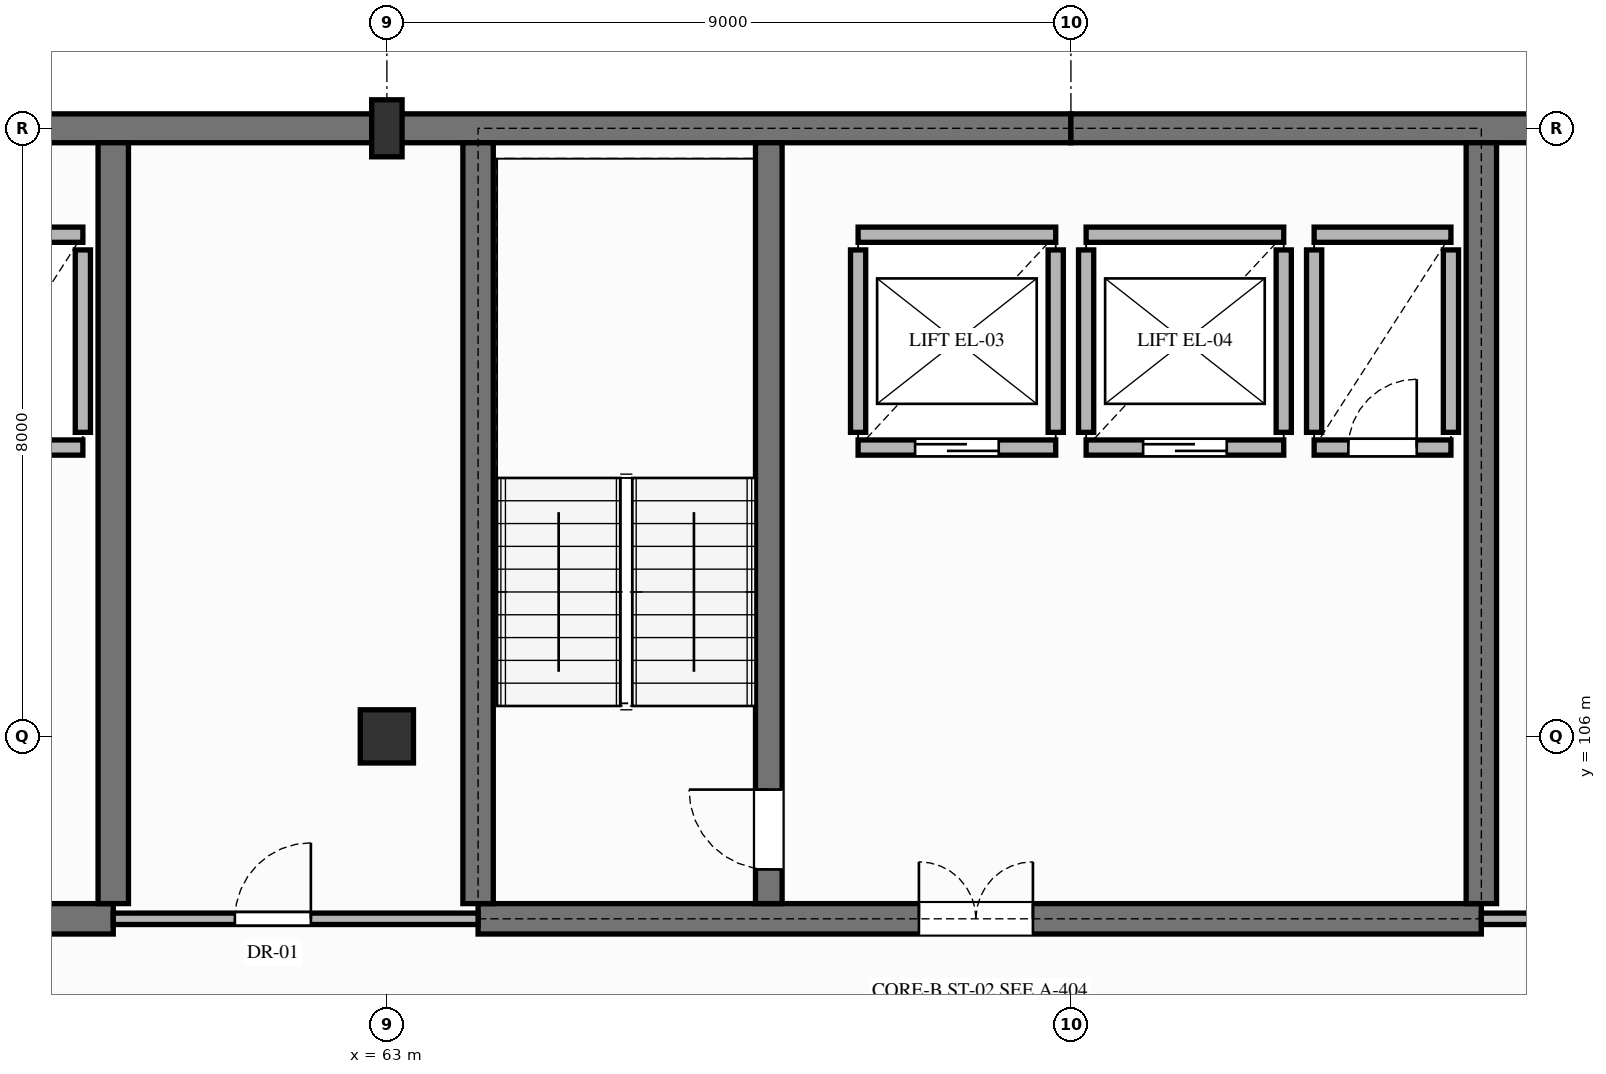
"""IFC4 building model, lengths in metres.
Left out: names, types, materials, properties, quantities, classifications, styles, units other than length and angle.
Written with IfcOpenShell. Run it as: python <this file> out.ifc"""

import sys

from ifc_helpers import new_model, si_unit, direction, frame, frame_2d, origin, origin_2d, place, context, subcontext, project, spatial, rectangle, extrude, element, fill, save


model = new_model("IFC4")
c1 = context("Model", 3, precision=1e-05, world=origin(), true_north=direction((0.0, 1.0)))
c2 = subcontext(c1, "Body", "Model", "MODEL_VIEW")
j1 = project(units=[si_unit("LENGTHUNIT", "METRE"), si_unit("PLANEANGLEUNIT", "RADIAN")], contexts=[c1])
p1 = place(None, origin())
s1 = spatial("IfcSite", under=j1, at=p1, CompositionType="ELEMENT")
p2 = place(p1, origin())
s2 = spatial("IfcBuilding", under=s1, at=p2, CompositionType="ELEMENT")
p3 = place(p2, frame((0.0, 0.0, 12.78)))
s3 = spatial("IfcBuildingStorey", under=s2, at=p3, CompositionType="ELEMENT", Elevation=12.78)
p4 = place(p3, frame((63.0, 106.0, 0.0), z_axis=(0.0, 0.0, 1.0), x_axis=(1.0, 0.0, 0.0)))
e1 = element("IfcColumn", 1, at=p4, inside=s3, PredefinedType="COLUMN", context=c2, shape_type="SweptSolid", body=[
    extrude(rectangle(XDim=0.7, YDim=0.7, at=origin_2d()), origin(), (0.0, 0.0, 1.0), 3.74),
])
p5 = place(p3, frame((63.0, 114.0, 0.0), z_axis=(0.0, 0.0, 1.0), x_axis=(0.0, 1.0, 0.0)))
e2 = element("IfcColumn", 2, at=p5, inside=s3, PredefinedType="COLUMN", context=c2, shape_type="SweptSolid", body=[
    extrude(rectangle(XDim=0.4, YDim=0.75, at=origin_2d()), origin(), (0.0, 0.0, 1.0), 3.74),
])
for number, where, z_axis, x_axis in (
    (3, (54.0, 114.0, 0.0), (0.0, 0.0, 1.0), (1.0, 0.0, 0.0)),
    (4, (63.0, 114.0, 0.0), (0.0, 0.0, 1.0), (1.0, 0.0, 0.0)),
    (5, (72.0, 114.0, 0.0), (0.0, 0.0, 1.0), (1.0, 0.0, 0.0)),
):
    element("IfcWall", number, at=place(p3, frame(where, z_axis=z_axis, x_axis=x_axis)), inside=s3, PredefinedType="SOLIDWALL", context=c2, shape_type="SweptSolid", body=[
        extrude(rectangle(XDim=9.0, YDim=0.38, at=frame_2d((4.5, 0.0))), origin(), (0.0, 0.0, 1.0), 3.42),
    ])
p6 = place(p3, frame((46.2, 103.6, 0.0), z_axis=(0.0, 0.0, 1.0), x_axis=(1.0, 0.0, 0.0)))
e6 = element("IfcWall", 6, at=p6, inside=s3, PredefinedType="SHEAR", context=c2, shape_type="SweptSolid", body=[
    extrude(rectangle(XDim=13.2, YDim=0.4, at=frame_2d((6.6, 0.0))), origin(), (0.0, 0.0, 1.0), 3.42),
])
p7 = place(p6, frame((5.8, 0.0, 0.0)))
e7 = element("IfcOpeningElement", 7, at=p7, cuts=e6, PredefinedType="OPENING", context=c2, shape_type="SweptSolid", body=[
    extrude(rectangle(XDim=1.5, YDim=2.2, at=frame_2d((0.75, 1.1))), frame((0.0, 0.21, 0.0), z_axis=(0.0, -1.0, 0.0), x_axis=(1.0, 0.0, 0.0)), (0.0, 0.0, 1.0), 0.42),
])
p8 = place(p3, frame((59.4, 103.8, 0.0), z_axis=(0.0, 0.0, 1.0), x_axis=(0.0, 1.0, 0.0)))
e8 = element("IfcWall", 8, at=p8, inside=s3, PredefinedType="SHEAR", context=c2, shape_type="SweptSolid", body=[
    extrude(rectangle(XDim=10.01, YDim=0.4, at=frame_2d((5.005, 0.0))), origin(), (0.0, 0.0, 1.0), 3.42),
])
p9 = place(p3, frame((57.2, 109.8, 0.0), z_axis=(0.0, 0.0, 1.0), x_axis=(1.0, 0.0, 0.0)))
e9 = element("IfcWall", 9, at=p9, inside=s3, PredefinedType="PARTITIONING", context=c2, shape_type="SweptSolid", body=[
    extrude(rectangle(XDim=1.8, YDim=0.2, at=frame_2d((0.9, 0.0))), origin(), (0.0, 0.0, 1.0), 3.42),
])
p10 = place(p9, frame((0.45, 0.0, 0.0)))
e10 = element("IfcOpeningElement", 10, at=p10, cuts=e9, PredefinedType="OPENING", context=c2, shape_type="SweptSolid", body=[
    extrude(rectangle(XDim=0.9, YDim=2.1, at=frame_2d((0.45, 1.05))), frame((0.0, 0.11, 0.0), z_axis=(0.0, -1.0, 0.0), x_axis=(1.0, 0.0, 0.0)), (0.0, 0.0, 1.0), 0.22),
])
p11 = place(p3, frame((57.2, 112.6, 0.0), z_axis=(0.0, 0.0, 1.0), x_axis=(1.0, 0.0, 0.0)))
e11 = element("IfcWall", 11, at=p11, inside=s3, PredefinedType="PARTITIONING", context=c2, shape_type="SweptSolid", body=[
    extrude(rectangle(XDim=1.8, YDim=0.2, at=frame_2d((0.9, 0.0))), origin(), (0.0, 0.0, 1.0), 3.42),
])
p12 = place(p3, frame((59.0, 110.0, 0.0), z_axis=(0.0, 0.0, 1.0), x_axis=(0.0, 1.0, 0.0)))
e12 = element("IfcWall", 12, at=p12, inside=s3, PredefinedType="PARTITIONING", context=c2, shape_type="SweptSolid", body=[
    extrude(rectangle(XDim=2.4, YDim=0.2, at=frame_2d((1.2, 0.0))), origin(), (0.0, 0.0, 1.0), 3.42),
])
p13 = place(p3, frame((64.2, 103.6, 0.0), z_axis=(0.0, 0.0, 1.0), x_axis=(1.0, 0.0, 0.0)))
e13 = element("IfcWall", 13, at=p13, inside=s3, PredefinedType="SHEAR", context=c2, shape_type="SweptSolid", body=[
    extrude(rectangle(XDim=13.2, YDim=0.4, at=frame_2d((6.6, 0.0))), origin(), (0.0, 0.0, 1.0), 3.42),
])
p14 = place(p13, frame((5.8, 0.0, 0.0)))
e14 = element("IfcOpeningElement", 14, at=p14, cuts=e13, PredefinedType="OPENING", context=c2, shape_type="SweptSolid", body=[
    extrude(rectangle(XDim=1.5, YDim=2.2, at=frame_2d((0.75, 1.1))), frame((0.0, 0.21, 0.0), z_axis=(0.0, -1.0, 0.0), x_axis=(1.0, 0.0, 0.0)), (0.0, 0.0, 1.0), 0.42),
])
for number, where, z_axis, x_axis in (
    (15, (64.2, 103.8, 0.0), (0.0, 0.0, 1.0), (0.0, 1.0, 0.0)),
    (16, (77.4, 103.8, 0.0), (0.0, 0.0, 1.0), (0.0, 1.0, 0.0)),
):
    element("IfcWall", number, at=place(p3, frame(where, z_axis=z_axis, x_axis=x_axis)), inside=s3, PredefinedType="SHEAR", context=c2, shape_type="SweptSolid", body=[
        extrude(rectangle(XDim=10.01, YDim=0.4, at=frame_2d((5.005, 0.0))), origin(), (0.0, 0.0, 1.0), 3.42),
    ])
p15 = place(p3, frame((68.025, 103.8, 0.0), z_axis=(0.0, 0.0, 1.0), x_axis=(0.0, 1.0, 0.0)))
e17 = element("IfcWall", 17, at=p15, inside=s3, PredefinedType="SHEAR", context=c2, shape_type="SweptSolid", body=[
    extrude(rectangle(XDim=10.01, YDim=0.35, at=frame_2d((5.005, 0.0))), origin(), (0.0, 0.0, 1.0), 3.42),
])
p16 = place(p15, frame((0.45, 0.0, 0.0)))
e18 = element("IfcOpeningElement", 18, at=p16, cuts=e17, PredefinedType="OPENING", context=c2, shape_type="SweptSolid", body=[
    extrude(rectangle(XDim=1.05, YDim=2.2, at=frame_2d((0.525, 1.1))), frame((0.0, 0.185, 0.0), z_axis=(0.0, -1.0, 0.0), x_axis=(1.0, 0.0, 0.0)), (0.0, 0.0, 1.0), 0.37),
])
p17 = place(p3, frame((69.2, 109.8, 0.0), z_axis=(0.0, 0.0, 1.0), x_axis=(1.0, 0.0, 0.0)))
e19 = element("IfcWall", 19, at=p17, inside=s3, PredefinedType="PARTITIONING", context=c2, shape_type="SweptSolid", body=[
    extrude(rectangle(XDim=2.6, YDim=0.2, at=frame_2d((1.3, 0.0))), origin(), (0.0, 0.0, 1.0), 3.42),
])
p18 = place(p17, frame((0.75, 0.0, 0.0)))
e20 = element("IfcOpeningElement", 20, at=p18, cuts=e19, PredefinedType="OPENING", context=c2, shape_type="SweptSolid", body=[
    extrude(rectangle(XDim=1.1, YDim=2.15, at=frame_2d((0.55, 1.075))), frame((0.0, 0.11, 0.0), z_axis=(0.0, -1.0, 0.0), x_axis=(1.0, 0.0, 0.0)), (0.0, 0.0, 1.0), 0.22),
])
p19 = place(p3, frame((69.2, 112.6, 0.0), z_axis=(0.0, 0.0, 1.0), x_axis=(1.0, 0.0, 0.0)))
e21 = element("IfcWall", 21, at=p19, inside=s3, PredefinedType="PARTITIONING", context=c2, shape_type="SweptSolid", body=[
    extrude(rectangle(XDim=2.6, YDim=0.2, at=frame_2d((1.3, 0.0))), origin(), (0.0, 0.0, 1.0), 3.42),
])
for number, where, z_axis, x_axis in (
    (22, (69.2, 110.0, 0.0), (0.0, 0.0, 1.0), (0.0, 1.0, 0.0)),
    (23, (71.8, 110.0, 0.0), (0.0, 0.0, 1.0), (0.0, 1.0, 0.0)),
):
    element("IfcWall", number, at=place(p3, frame(where, z_axis=z_axis, x_axis=x_axis)), inside=s3, PredefinedType="PARTITIONING", context=c2, shape_type="SweptSolid", body=[
        extrude(rectangle(XDim=2.4, YDim=0.2, at=frame_2d((1.2, 0.0))), origin(), (0.0, 0.0, 1.0), 3.42),
    ])
p20 = place(p3, frame((72.2, 109.8, 0.0), z_axis=(0.0, 0.0, 1.0), x_axis=(1.0, 0.0, 0.0)))
e24 = element("IfcWall", 24, at=p20, inside=s3, PredefinedType="PARTITIONING", context=c2, shape_type="SweptSolid", body=[
    extrude(rectangle(XDim=2.6, YDim=0.2, at=frame_2d((1.3, 0.0))), origin(), (0.0, 0.0, 1.0), 3.42),
])
p21 = place(p20, frame((0.75, 0.0, 0.0)))
e25 = element("IfcOpeningElement", 25, at=p21, cuts=e24, PredefinedType="OPENING", context=c2, shape_type="SweptSolid", body=[
    extrude(rectangle(XDim=1.1, YDim=2.15, at=frame_2d((0.55, 1.075))), frame((0.0, 0.11, 0.0), z_axis=(0.0, -1.0, 0.0), x_axis=(1.0, 0.0, 0.0)), (0.0, 0.0, 1.0), 0.22),
])
p22 = place(p3, frame((72.2, 112.6, 0.0), z_axis=(0.0, 0.0, 1.0), x_axis=(1.0, 0.0, 0.0)))
e26 = element("IfcWall", 26, at=p22, inside=s3, PredefinedType="PARTITIONING", context=c2, shape_type="SweptSolid", body=[
    extrude(rectangle(XDim=2.6, YDim=0.2, at=frame_2d((1.3, 0.0))), origin(), (0.0, 0.0, 1.0), 3.42),
])
for number, where, z_axis, x_axis in (
    (27, (72.2, 110.0, 0.0), (0.0, 0.0, 1.0), (0.0, 1.0, 0.0)),
    (28, (74.8, 110.0, 0.0), (0.0, 0.0, 1.0), (0.0, 1.0, 0.0)),
):
    element("IfcWall", number, at=place(p3, frame(where, z_axis=z_axis, x_axis=x_axis)), inside=s3, PredefinedType="PARTITIONING", context=c2, shape_type="SweptSolid", body=[
        extrude(rectangle(XDim=2.4, YDim=0.2, at=frame_2d((1.2, 0.0))), origin(), (0.0, 0.0, 1.0), 3.42),
    ])
p23 = place(p3, frame((75.2, 109.8, 0.0), z_axis=(0.0, 0.0, 1.0), x_axis=(1.0, 0.0, 0.0)))
e29 = element("IfcWall", 29, at=p23, inside=s3, PredefinedType="PARTITIONING", context=c2, shape_type="SweptSolid", body=[
    extrude(rectangle(XDim=1.8, YDim=0.2, at=frame_2d((0.9, 0.0))), origin(), (0.0, 0.0, 1.0), 3.42),
])
p24 = place(p23, frame((0.45, 0.0, 0.0)))
e30 = element("IfcOpeningElement", 30, at=p24, cuts=e29, PredefinedType="OPENING", context=c2, shape_type="SweptSolid", body=[
    extrude(rectangle(XDim=0.9, YDim=2.1, at=frame_2d((0.45, 1.05))), frame((0.0, 0.11, 0.0), z_axis=(0.0, -1.0, 0.0), x_axis=(1.0, 0.0, 0.0)), (0.0, 0.0, 1.0), 0.22),
])
p25 = place(p3, frame((75.2, 112.6, 0.0), z_axis=(0.0, 0.0, 1.0), x_axis=(1.0, 0.0, 0.0)))
e31 = element("IfcWall", 31, at=p25, inside=s3, PredefinedType="PARTITIONING", context=c2, shape_type="SweptSolid", body=[
    extrude(rectangle(XDim=1.8, YDim=0.2, at=frame_2d((0.9, 0.0))), origin(), (0.0, 0.0, 1.0), 3.42),
])
for number, where, z_axis, x_axis in (
    (32, (75.2, 110.0, 0.0), (0.0, 0.0, 1.0), (0.0, 1.0, 0.0)),
    (33, (77.0, 110.0, 0.0), (0.0, 0.0, 1.0), (0.0, 1.0, 0.0)),
):
    element("IfcWall", number, at=place(p3, frame(where, z_axis=z_axis, x_axis=x_axis)), inside=s3, PredefinedType="PARTITIONING", context=c2, shape_type="SweptSolid", body=[
        extrude(rectangle(XDim=2.4, YDim=0.2, at=frame_2d((1.2, 0.0))), origin(), (0.0, 0.0, 1.0), 3.42),
    ])
p26 = place(p3, frame((59.4, 103.6, 0.0), z_axis=(0.0, 0.0, 1.0), x_axis=(1.0, 0.0, 0.0)))
e34 = element("IfcWall", 34, at=p26, inside=s3, PredefinedType="PARTITIONING", context=c2, shape_type="SweptSolid", body=[
    extrude(rectangle(XDim=4.8, YDim=0.15, at=frame_2d((2.4, 0.0))), origin(), (0.0, 0.0, 1.0), 3.42),
])
p27 = place(p26, frame((1.6, 0.0, 0.0)))
e35 = element("IfcOpeningElement", 35, at=p27, cuts=e34, PredefinedType="OPENING", context=c2, shape_type="SweptSolid", body=[
    extrude(rectangle(XDim=1.0, YDim=2.15, at=frame_2d((0.5, 1.075))), frame((0.0, 0.085, 0.0), z_axis=(0.0, -1.0, 0.0), x_axis=(1.0, 0.0, 0.0)), (0.0, 0.0, 1.0), 0.17),
])
p28 = place(p3, frame((77.4, 103.6, 0.0), z_axis=(0.0, 0.0, 1.0), x_axis=(1.0, 0.0, 0.0)))
e36 = element("IfcWall", 36, at=p28, inside=s3, PredefinedType="PARTITIONING", context=c2, shape_type="SweptSolid", body=[
    extrude(rectangle(XDim=12.6, YDim=0.15, at=frame_2d((6.3, 0.0))), origin(), (0.0, 0.0, 1.0), 3.42),
])
p29 = place(p28, frame((5.6, 0.0, 0.0)))
e37 = element("IfcOpeningElement", 37, at=p29, cuts=e36, PredefinedType="OPENING", context=c2, shape_type="SweptSolid", body=[
    extrude(rectangle(XDim=1.0, YDim=2.15, at=frame_2d((0.5, 1.075))), frame((0.0, 0.085, 0.0), z_axis=(0.0, -1.0, 0.0), x_axis=(1.0, 0.0, 0.0)), (0.0, 0.0, 1.0), 0.17),
])
p30 = place(p14, origin())
e38 = element("IfcDoor", 38, at=p30, inside=s3, OperationType="DOUBLE_DOOR_SINGLE_SWING", PredefinedType="DOOR", context=c2, shape_type="SweptSolid", body=[
    extrude(rectangle(XDim=1.5, YDim=2.2, at=frame_2d((0.75, 1.1))), frame((0.0, 0.025, 0.0), z_axis=(0.0, -1.0, 0.0), x_axis=(1.0, 0.0, 0.0)), (0.0, 0.0, 1.0), 0.05),
])
fill(e14, e38)
p31 = place(p16, origin())
e39 = element("IfcDoor", 39, at=p31, inside=s3, OperationType="SINGLE_SWING_RIGHT", PredefinedType="DOOR", context=c2, shape_type="SweptSolid", body=[
    extrude(rectangle(XDim=1.05, YDim=2.2, at=frame_2d((0.525, 1.1))), frame((0.0, 0.025, 0.0), z_axis=(0.0, -1.0, 0.0), x_axis=(1.0, 0.0, 0.0)), (0.0, 0.0, 1.0), 0.05),
])
fill(e18, e39)
p32 = place(p18, origin())
e40 = element("IfcDoor", 40, at=p32, inside=s3, OperationType="SLIDING_TO_LEFT", PredefinedType="DOOR", context=c2, shape_type="SweptSolid", body=[
    extrude(rectangle(XDim=1.1, YDim=2.15, at=frame_2d((0.55, 1.075))), frame((0.0, 0.025, 0.0), z_axis=(0.0, -1.0, 0.0), x_axis=(1.0, 0.0, 0.0)), (0.0, 0.0, 1.0), 0.05),
])
fill(e20, e40)
p33 = place(p21, origin())
e41 = element("IfcDoor", 41, at=p33, inside=s3, OperationType="SLIDING_TO_RIGHT", PredefinedType="DOOR", context=c2, shape_type="SweptSolid", body=[
    extrude(rectangle(XDim=1.1, YDim=2.15, at=frame_2d((0.55, 1.075))), frame((0.0, 0.025, 0.0), z_axis=(0.0, -1.0, 0.0), x_axis=(1.0, 0.0, 0.0)), (0.0, 0.0, 1.0), 0.05),
])
fill(e25, e41)
p34 = place(p24, origin())
e42 = element("IfcDoor", 42, at=p34, inside=s3, OperationType="SINGLE_SWING_RIGHT", PredefinedType="DOOR", context=c2, shape_type="SweptSolid", body=[
    extrude(rectangle(XDim=0.9, YDim=2.1, at=frame_2d((0.45, 1.05))), frame((0.0, 0.025, 0.0), z_axis=(0.0, -1.0, 0.0), x_axis=(1.0, 0.0, 0.0)), (0.0, 0.0, 1.0), 0.05),
])
fill(e30, e42)
p35 = place(p27, origin())
e43 = element("IfcDoor", 43, at=p35, inside=s3, OperationType="SINGLE_SWING_RIGHT", PredefinedType="DOOR", context=c2, shape_type="SweptSolid", body=[
    extrude(rectangle(XDim=1.0, YDim=2.15, at=frame_2d((0.5, 1.075))), frame((0.0, 0.025, 0.0), z_axis=(0.0, -1.0, 0.0), x_axis=(1.0, 0.0, 0.0)), (0.0, 0.0, 1.0), 0.05),
])
fill(e35, e43)
save(model, sys.argv[1])
